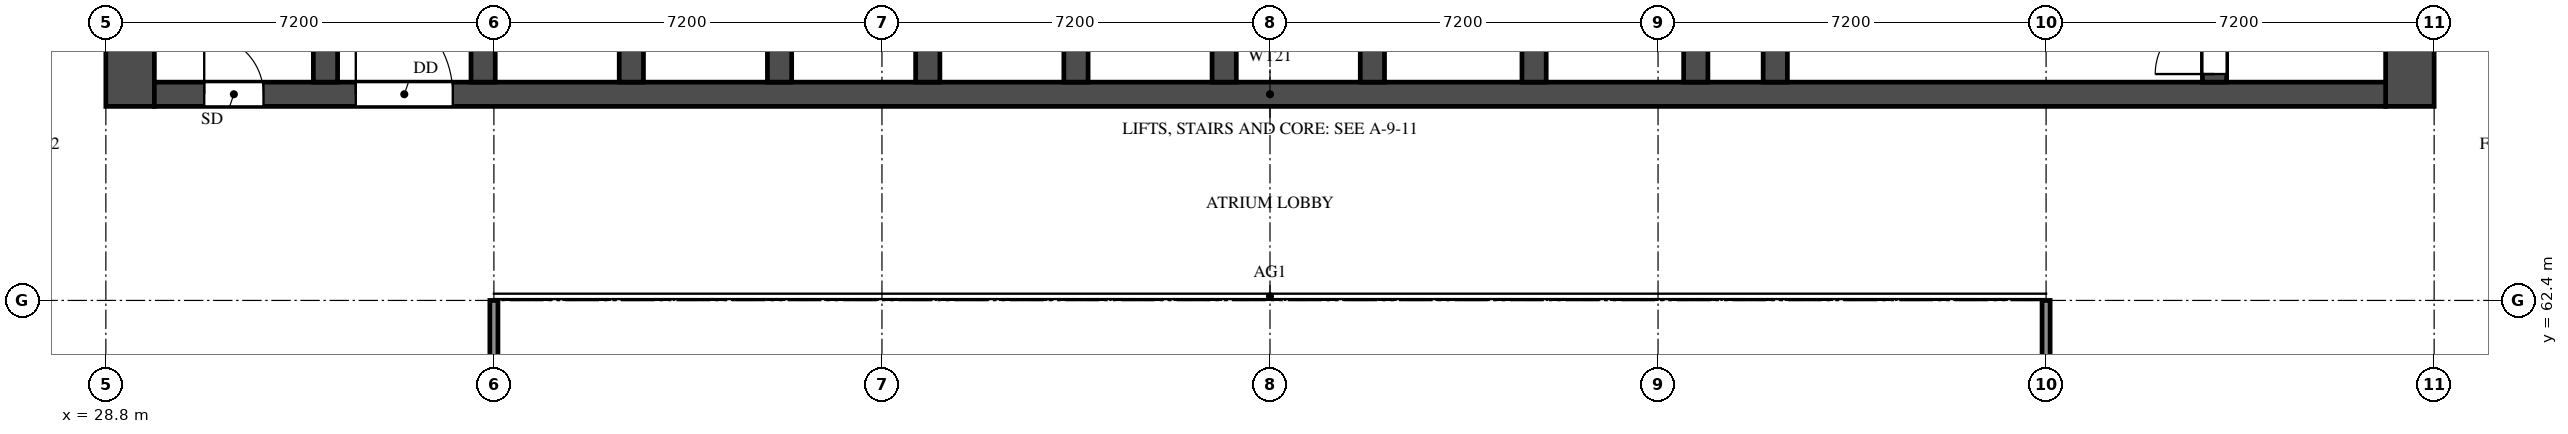
"""IFC4 building model, lengths in metres.
Left out: names, types, materials, properties, quantities, classifications, styles, units other than length and angle.
Written with IfcOpenShell. Run it as: python <this file> out.ifc"""

import sys

from ifc_helpers import new_model, si_unit, direction, frame, frame_2d, origin, place, context, subcontext, project, spatial, rectangle, extrude, element, fill, save


model = new_model("IFC4")
c1 = context("Model", 3, precision=1e-05, world=origin(), true_north=direction((0.0, 1.0)))
c2 = subcontext(c1, "Body", "Model", "MODEL_VIEW")
j1 = project(units=[si_unit("LENGTHUNIT", "METRE"), si_unit("PLANEANGLEUNIT", "RADIAN")], contexts=[c1])
p1 = place(None, origin())
s1 = spatial("IfcSite", under=j1, at=p1, CompositionType="ELEMENT")
p2 = place(p1, origin())
s2 = spatial("IfcBuilding", under=s1, at=p2, CompositionType="ELEMENT")
p3 = place(p2, frame((0.0, 0.0, 65.5)))
s3 = spatial("IfcBuildingStorey", under=s2, at=p3, CompositionType="ELEMENT", Elevation=65.5)
for number, where, z_axis, x_axis in (
    (1, (29.25, 66.0, 0.0), (0.0, 0.0, 1.0), (0.0, 1.0, 0.0)),
    (2, (71.55, 66.0, 0.0), (0.0, 0.0, 1.0), (0.0, 1.0, 0.0)),
):
    element("IfcWall", number, at=place(p3, frame(where, z_axis=z_axis, x_axis=x_axis)), inside=s3, PredefinedType="SHEAR", context=c2, shape_type="SweptSolid", body=[
        extrude(rectangle(XDim=12.0, YDim=0.9, at=frame_2d((6.0, 0.0))), origin(), (0.0, 0.0, 1.0), 3.18),
    ])
p4 = place(p3, frame((29.7, 66.225, 0.0), z_axis=(0.0, 0.0, 1.0), x_axis=(1.0, 0.0, 0.0)))
e3 = element("IfcWall", 3, at=p4, inside=s3, PredefinedType="SHEAR", context=c2, shape_type="SweptSolid", body=[
    extrude(rectangle(XDim=41.4, YDim=0.45, at=frame_2d((20.7, 0.0))), origin(), (0.0, 0.0, 1.0), 3.18),
])
p5 = place(p4, frame((0.925, 0.0, 0.0)))
e4 = element("IfcOpeningElement", 4, at=p5, cuts=e3, PredefinedType="OPENING", context=c2, shape_type="SweptSolid", body=[
    extrude(rectangle(XDim=1.1, YDim=2.1, at=frame_2d((0.55, 1.05))), frame((0.0, 0.235, 0.0), z_axis=(0.0, -1.0, 0.0), x_axis=(1.0, 0.0, 0.0)), (0.0, 0.0, 1.0), 0.47),
])
p6 = place(p4, frame((3.738, 0.0, 0.0)))
e5 = element("IfcOpeningElement", 5, at=p6, cuts=e3, PredefinedType="OPENING", context=c2, shape_type="SweptSolid", body=[
    extrude(rectangle(XDim=1.8, YDim=2.1, at=frame_2d((0.9, 1.05))), frame((0.0, 0.235, 0.0), z_axis=(0.0, -1.0, 0.0), x_axis=(1.0, 0.0, 0.0)), (0.0, 0.0, 1.0), 0.47),
])
p7 = place(p3, frame((32.875, 66.45, 0.0), z_axis=(0.0, 0.0, 1.0), x_axis=(0.0, 1.0, 0.0)))
e6 = element("IfcWall", 6, at=p7, inside=s3, PredefinedType="SHEAR", context=c2, shape_type="SweptSolid", body=[
    extrude(rectangle(XDim=10.65, YDim=0.45, at=frame_2d((5.325, 0.0))), origin(), (0.0, 0.0, 1.0), 3.18),
])
p8 = place(p3, frame((67.925, 66.45, 0.0), z_axis=(0.0, 0.0, 1.0), x_axis=(0.0, 1.0, 0.0)))
e7 = element("IfcWall", 7, at=p8, inside=s3, PredefinedType="SHEAR", context=c2, shape_type="SweptSolid", body=[
    extrude(rectangle(XDim=10.65, YDim=0.45, at=frame_2d((5.325, 0.0))), origin(), (0.0, 0.0, 1.0), 3.18),
])
p9 = place(p8, frame((0.15, 0.0, 0.0)))
e8 = element("IfcOpeningElement", 8, at=p9, cuts=e7, PredefinedType="OPENING", context=c2, shape_type="SweptSolid", body=[
    extrude(rectangle(XDim=1.1, YDim=2.1, at=frame_2d((0.55, 1.05))), frame((0.0, 0.235, 0.0), z_axis=(0.0, -1.0, 0.0), x_axis=(1.0, 0.0, 0.0)), (0.0, 0.0, 1.0), 0.47),
])
p10 = place(p3, frame((59.775, 66.45, 0.0), z_axis=(0.0, 0.0, 1.0), x_axis=(0.0, 1.0, 0.0)))
e9 = element("IfcWall", 9, at=p10, inside=s3, PredefinedType="SHEAR", context=c2, shape_type="SweptSolid", body=[
    extrude(rectangle(XDim=6.025, YDim=0.45, at=frame_2d((3.013, 0.0))), origin(), (0.0, 0.0, 1.0), 3.18),
])
p11 = place(p10, frame((3.85, 0.0, 0.0)))
e10 = element("IfcOpeningElement", 10, at=p11, cuts=e9, PredefinedType="OPENING", context=c2, shape_type="SweptSolid", body=[
    extrude(rectangle(XDim=1.2, YDim=2.1, at=frame_2d((0.6, 1.05))), frame((0.0, 0.235, 0.0), z_axis=(0.0, -1.0, 0.0), x_axis=(1.0, 0.0, 0.0)), (0.0, 0.0, 1.0), 0.47),
])
for number, where, z_axis, x_axis in (
    (11, (35.8, 66.45, 0.0), (0.0, 0.0, 1.0), (0.0, 1.0, 0.0)),
    (12, (38.55, 66.45, 0.0), (0.0, 0.0, 1.0), (0.0, 1.0, 0.0)),
    (13, (41.3, 66.45, 0.0), (0.0, 0.0, 1.0), (0.0, 1.0, 0.0)),
    (14, (44.05, 66.45, 0.0), (0.0, 0.0, 1.0), (0.0, 1.0, 0.0)),
    (15, (46.8, 66.45, 0.0), (0.0, 0.0, 1.0), (0.0, 1.0, 0.0)),
    (16, (49.55, 66.45, 0.0), (0.0, 0.0, 1.0), (0.0, 1.0, 0.0)),
    (17, (52.3, 66.45, 0.0), (0.0, 0.0, 1.0), (0.0, 1.0, 0.0)),
    (18, (55.3, 66.45, 0.0), (0.0, 0.0, 1.0), (0.0, 1.0, 0.0)),
    (19, (58.3, 66.45, 0.0), (0.0, 0.0, 1.0), (0.0, 1.0, 0.0)),
):
    element("IfcWall", number, at=place(p3, frame(where, z_axis=z_axis, x_axis=x_axis)), inside=s3, PredefinedType="SHEAR", context=c2, shape_type="SweptSolid", body=[
        extrude(rectangle(XDim=2.425, YDim=0.45, at=frame_2d((1.212, 0.0))), origin(), (0.0, 0.0, 1.0), 3.18),
    ])
for number, where, z_axis, x_axis in (
    (20, (36.0, 48.0, 0.0), (0.0, 0.0, 1.0), (0.0, 1.0, 0.0)),
    (21, (64.8, 48.0, 0.0), (0.0, 0.0, 1.0), (0.0, 1.0, 0.0)),
):
    element("IfcWall", number, at=place(p3, frame(where, z_axis=z_axis, x_axis=x_axis)), inside=s3, PredefinedType="SOLIDWALL", context=c2, shape_type="SweptSolid", body=[
        extrude(rectangle(XDim=14.4, YDim=0.15, at=frame_2d((7.2, 0.0))), origin(), (0.0, 0.0, 1.0), 2.28),
    ])
p12 = place(p5, origin())
e22 = element("IfcDoor", 22, at=p12, inside=s3, OperationType="SINGLE_SWING_LEFT", PredefinedType="DOOR", context=c2, shape_type="SweptSolid", body=[
    extrude(rectangle(XDim=1.1, YDim=2.1, at=frame_2d((0.55, 1.05))), frame((0.0, 0.025, 0.0), z_axis=(0.0, -1.0, 0.0), x_axis=(1.0, 0.0, 0.0)), (0.0, 0.0, 1.0), 0.05),
])
fill(e4, e22)
p13 = place(p9, origin())
e23 = element("IfcDoor", 23, at=p13, inside=s3, OperationType="SINGLE_SWING_LEFT", PredefinedType="DOOR", context=c2, shape_type="SweptSolid", body=[
    extrude(rectangle(XDim=1.1, YDim=2.1, at=frame_2d((0.55, 1.05))), frame((0.0, 0.025, 0.0), z_axis=(0.0, -1.0, 0.0), x_axis=(1.0, 0.0, 0.0)), (0.0, 0.0, 1.0), 0.05),
])
fill(e8, e23)
p14 = place(p6, origin())
e24 = element("IfcDoor", 24, at=p14, inside=s3, OperationType="DOUBLE_DOOR_SINGLE_SWING", PredefinedType="DOOR", context=c2, shape_type="SweptSolid", body=[
    extrude(rectangle(XDim=1.8, YDim=2.1, at=frame_2d((0.9, 1.05))), frame((0.0, 0.025, 0.0), z_axis=(0.0, -1.0, 0.0), x_axis=(1.0, 0.0, 0.0)), (0.0, 0.0, 1.0), 0.05),
])
fill(e5, e24)
save(model, sys.argv[1])
